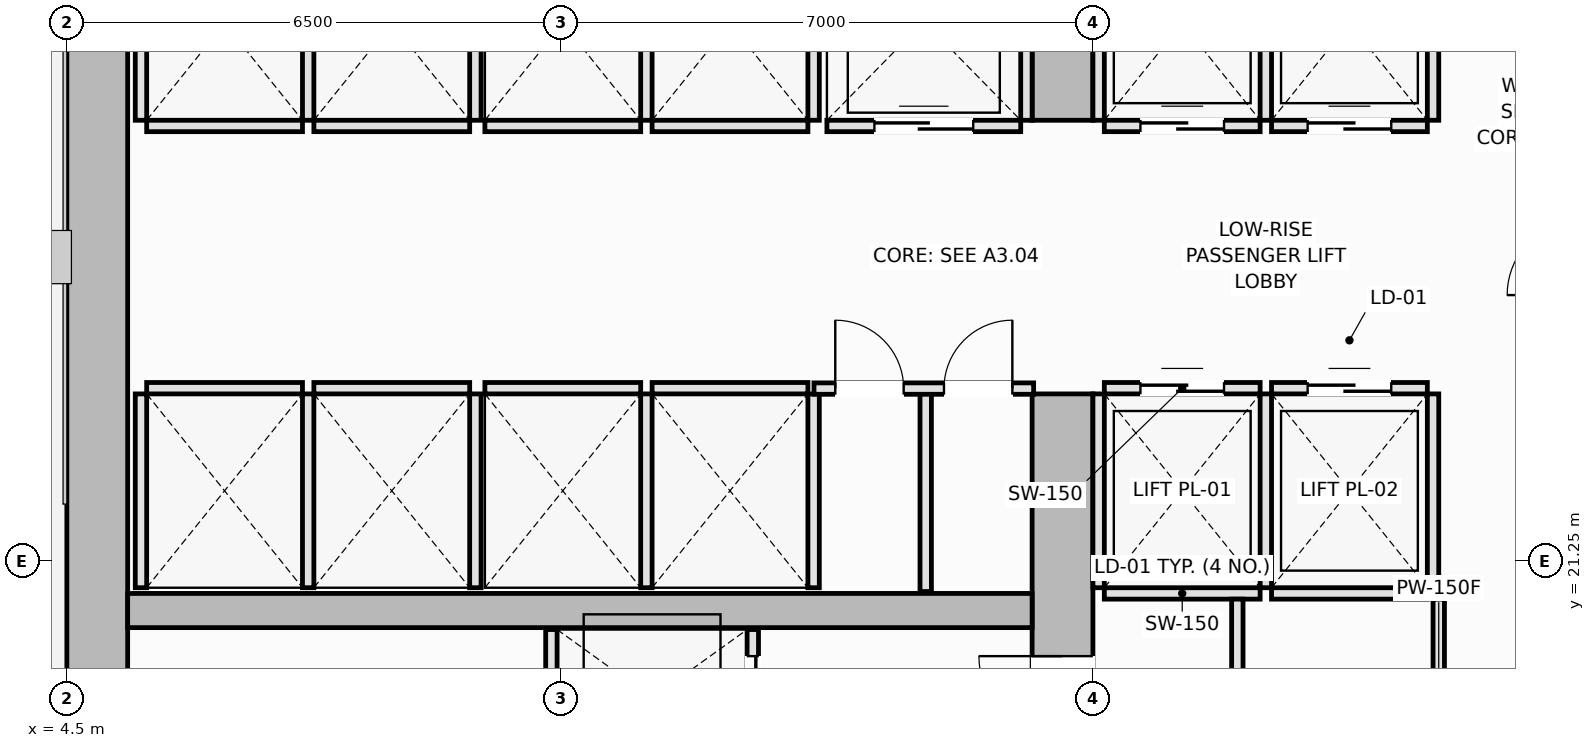
"""IFC4 building model, lengths in metres.
Left out: names, types, materials, properties, quantities, classifications, styles, units other than length and angle.
Written with IfcOpenShell. Run it as: python <this file> out.ifc"""

import sys

from ifc_helpers import new_model, si_unit, direction, frame, frame_2d, origin, place, context, subcontext, project, spatial, rectangle, extrude, element, fill, save


model = new_model("IFC4")
c1 = context("Model", 3, precision=1e-05, world=origin(), true_north=direction((0.0, 1.0)))
c2 = subcontext(c1, "Body", "Model", "MODEL_VIEW")
j1 = project(units=[si_unit("LENGTHUNIT", "METRE"), si_unit("PLANEANGLEUNIT", "RADIAN")], contexts=[c1])
p1 = place(None, origin())
s1 = spatial("IfcSite", under=j1, at=p1, CompositionType="ELEMENT")
p2 = place(p1, origin())
s2 = spatial("IfcBuilding", under=s1, at=p2, CompositionType="ELEMENT")
p3 = place(p2, frame((0.0, 0.0, 25.6)))
s3 = spatial("IfcBuildingStorey", under=s2, at=p3, CompositionType="ELEMENT", Elevation=25.6)
p4 = place(p3, frame((4.9, 14.8, 0.0), z_axis=(0.0, 0.0, 1.0), x_axis=(0.0, 1.0, 0.0)))
e1 = element("IfcWall", 1, at=p4, inside=s3, PredefinedType="SHEAR", context=c2, shape_type="SweptSolid", body=[
    extrude(rectangle(XDim=20.9, YDim=0.8, at=frame_2d((10.45, 0.0))), origin(), (0.0, 0.0, 1.0), 3.55),
])
p5 = place(p3, frame((17.6, 14.8, 0.0), z_axis=(0.0, 0.0, 1.0), x_axis=(0.0, 1.0, 0.0)))
e2 = element("IfcWall", 2, at=p5, inside=s3, PredefinedType="SHEAR", context=c2, shape_type="SweptSolid", body=[
    extrude(rectangle(XDim=8.65, YDim=0.8, at=frame_2d((4.325, 0.0))), origin(), (0.0, 0.0, 1.0), 3.55),
])
p6 = place(p5, frame((4.1, 0.0, 0.0)))
e3 = element("IfcOpeningElement", 3, at=p6, cuts=e2, PredefinedType="OPENING", context=c2, shape_type="SweptSolid", body=[
    extrude(rectangle(XDim=1.1, YDim=2.15, at=frame_2d((0.55, 1.075))), frame((0.0, 0.41, 0.0), z_axis=(0.0, -1.0, 0.0), x_axis=(1.0, 0.0, 0.0)), (0.0, 0.0, 1.0), 0.82),
])
p7 = place(p3, frame((17.6, 27.05, 0.0), z_axis=(0.0, 0.0, 1.0), x_axis=(0.0, 1.0, 0.0)))
e4 = element("IfcWall", 4, at=p7, inside=s3, PredefinedType="SHEAR", context=c2, shape_type="SweptSolid", body=[
    extrude(rectangle(XDim=8.65, YDim=0.8, at=frame_2d((4.325, 0.0))), origin(), (0.0, 0.0, 1.0), 3.55),
])
p8 = place(p7, frame((3.45, 0.0, 0.0)))
e5 = element("IfcOpeningElement", 5, at=p8, cuts=e4, PredefinedType="OPENING", context=c2, shape_type="SweptSolid", body=[
    extrude(rectangle(XDim=1.1, YDim=2.15, at=frame_2d((0.55, 1.075))), frame((0.0, 0.41, 0.0), z_axis=(0.0, -1.0, 0.0), x_axis=(1.0, 0.0, 0.0)), (0.0, 0.0, 1.0), 0.82),
])
p9 = place(p3, frame((5.3, 20.6, 0.0), z_axis=(0.0, 0.0, 1.0), x_axis=(1.0, 0.0, 0.0)))
e6 = element("IfcWall", 6, at=p9, inside=s3, PredefinedType="SHEAR", context=c2, shape_type="SweptSolid", body=[
    extrude(rectangle(XDim=11.9, YDim=0.45, at=frame_2d((5.95, 0.0))), origin(), (0.0, 0.0, 1.0), 3.55),
])
p10 = place(p3, frame((18.15, 20.825, 0.0), z_axis=(0.0, 0.0, 1.0), x_axis=(1.0, 0.0, 0.0)))
e7 = element("IfcWall", 7, at=p10, inside=s3, PredefinedType="PARTITIONING", context=c2, shape_type="SweptSolid", body=[
    extrude(rectangle(XDim=2.05, YDim=0.15, at=frame_2d((1.025, 0.0))), origin(), (0.0, 0.0, 1.0), 3.37),
])
p11 = place(p3, frame((18.15, 23.525, 0.0), z_axis=(0.0, 0.0, 1.0), x_axis=(1.0, 0.0, 0.0)))
e8 = element("IfcWall", 8, at=p11, inside=s3, PredefinedType="PARTITIONING", context=c2, shape_type="SweptSolid", body=[
    extrude(rectangle(XDim=2.05, YDim=0.15, at=frame_2d((1.025, 0.0))), origin(), (0.0, 0.0, 1.0), 3.37),
])
p12 = place(p11, frame((0.475, 0.0, 0.0)))
e9 = element("IfcOpeningElement", 9, at=p12, cuts=e8, PredefinedType="OPENING", context=c2, shape_type="SweptSolid", body=[
    extrude(rectangle(XDim=1.1, YDim=2.2, at=frame_2d((0.55, 1.1))), frame((0.0, 0.085, 0.0), z_axis=(0.0, -1.0, 0.0), x_axis=(1.0, 0.0, 0.0)), (0.0, 0.0, 1.0), 0.17),
])
for number, where, z_axis, x_axis in (
    (10, (18.075, 20.9, 0.0), (0.0, 0.0, 1.0), (0.0, 1.0, 0.0)),
    (11, (20.275, 20.9, 0.0), (0.0, 0.0, 1.0), (0.0, 1.0, 0.0)),
):
    element("IfcWall", number, at=place(p3, frame(where, z_axis=z_axis, x_axis=x_axis)), inside=s3, PredefinedType="PARTITIONING", context=c2, shape_type="SweptSolid", body=[
        extrude(rectangle(XDim=2.55, YDim=0.15, at=frame_2d((1.275, 0.0))), origin(), (0.0, 0.0, 1.0), 3.37),
    ])
p13 = place(p3, frame((20.35, 20.825, 0.0), z_axis=(0.0, 0.0, 1.0), x_axis=(1.0, 0.0, 0.0)))
e12 = element("IfcWall", 12, at=p13, inside=s3, PredefinedType="PARTITIONING", context=c2, shape_type="SweptSolid", body=[
    extrude(rectangle(XDim=2.05, YDim=0.15, at=frame_2d((1.025, 0.0))), origin(), (0.0, 0.0, 1.0), 3.37),
])
p14 = place(p3, frame((20.35, 23.525, 0.0), z_axis=(0.0, 0.0, 1.0), x_axis=(1.0, 0.0, 0.0)))
e13 = element("IfcWall", 13, at=p14, inside=s3, PredefinedType="PARTITIONING", context=c2, shape_type="SweptSolid", body=[
    extrude(rectangle(XDim=2.05, YDim=0.15, at=frame_2d((1.025, 0.0))), origin(), (0.0, 0.0, 1.0), 3.37),
])
p15 = place(p14, frame((0.475, 0.0, 0.0)))
e14 = element("IfcOpeningElement", 14, at=p15, cuts=e13, PredefinedType="OPENING", context=c2, shape_type="SweptSolid", body=[
    extrude(rectangle(XDim=1.1, YDim=2.2, at=frame_2d((0.55, 1.1))), frame((0.0, 0.085, 0.0), z_axis=(0.0, -1.0, 0.0), x_axis=(1.0, 0.0, 0.0)), (0.0, 0.0, 1.0), 0.17),
])
p16 = place(p3, frame((22.475, 20.9, 0.0), z_axis=(0.0, 0.0, 1.0), x_axis=(0.0, 1.0, 0.0)))
e15 = element("IfcWall", 15, at=p16, inside=s3, PredefinedType="PARTITIONING", context=c2, shape_type="SweptSolid", body=[
    extrude(rectangle(XDim=2.55, YDim=0.15, at=frame_2d((1.275, 0.0))), origin(), (0.0, 0.0, 1.0), 3.37),
])
p17 = place(p3, frame((18.15, 26.975, 0.0), z_axis=(0.0, 0.0, 1.0), x_axis=(1.0, 0.0, 0.0)))
e16 = element("IfcWall", 16, at=p17, inside=s3, PredefinedType="PARTITIONING", context=c2, shape_type="SweptSolid", body=[
    extrude(rectangle(XDim=2.05, YDim=0.15, at=frame_2d((1.025, 0.0))), origin(), (0.0, 0.0, 1.0), 3.37),
])
p18 = place(p17, frame((0.475, 0.0, 0.0)))
e17 = element("IfcOpeningElement", 17, at=p18, cuts=e16, PredefinedType="OPENING", context=c2, shape_type="SweptSolid", body=[
    extrude(rectangle(XDim=1.1, YDim=2.2, at=frame_2d((0.55, 1.1))), frame((0.0, 0.085, 0.0), z_axis=(0.0, -1.0, 0.0), x_axis=(1.0, 0.0, 0.0)), (0.0, 0.0, 1.0), 0.17),
])
for number, where, z_axis, x_axis in (
    (18, (18.075, 27.05, 0.0), (0.0, 0.0, 1.0), (0.0, 1.0, 0.0)),
    (19, (20.275, 27.05, 0.0), (0.0, 0.0, 1.0), (0.0, 1.0, 0.0)),
):
    element("IfcWall", number, at=place(p3, frame(where, z_axis=z_axis, x_axis=x_axis)), inside=s3, PredefinedType="PARTITIONING", context=c2, shape_type="SweptSolid", body=[
        extrude(rectangle(XDim=2.55, YDim=0.15, at=frame_2d((1.275, 0.0))), origin(), (0.0, 0.0, 1.0), 3.37),
    ])
p19 = place(p3, frame((20.35, 26.975, 0.0), z_axis=(0.0, 0.0, 1.0), x_axis=(1.0, 0.0, 0.0)))
e20 = element("IfcWall", 20, at=p19, inside=s3, PredefinedType="PARTITIONING", context=c2, shape_type="SweptSolid", body=[
    extrude(rectangle(XDim=2.05, YDim=0.15, at=frame_2d((1.025, 0.0))), origin(), (0.0, 0.0, 1.0), 3.37),
])
p20 = place(p19, frame((0.475, 0.0, 0.0)))
e21 = element("IfcOpeningElement", 21, at=p20, cuts=e20, PredefinedType="OPENING", context=c2, shape_type="SweptSolid", body=[
    extrude(rectangle(XDim=1.1, YDim=2.2, at=frame_2d((0.55, 1.1))), frame((0.0, 0.085, 0.0), z_axis=(0.0, -1.0, 0.0), x_axis=(1.0, 0.0, 0.0)), (0.0, 0.0, 1.0), 0.17),
])
p21 = place(p3, frame((22.475, 27.05, 0.0), z_axis=(0.0, 0.0, 1.0), x_axis=(0.0, 1.0, 0.0)))
e22 = element("IfcWall", 22, at=p21, inside=s3, PredefinedType="PARTITIONING", context=c2, shape_type="SweptSolid", body=[
    extrude(rectangle(XDim=2.55, YDim=0.15, at=frame_2d((1.275, 0.0))), origin(), (0.0, 0.0, 1.0), 3.37),
])
p22 = place(p3, frame((5.55, 23.525, 0.0), z_axis=(0.0, 0.0, 1.0), x_axis=(1.0, 0.0, 0.0)))
e23 = element("IfcWall", 23, at=p22, inside=s3, PredefinedType="PARTITIONING", context=c2, shape_type="SweptSolid", body=[
    extrude(rectangle(XDim=2.05, YDim=0.15, at=frame_2d((1.025, 0.0))), origin(), (0.0, 0.0, 1.0), 3.37),
])
for number, where, z_axis, x_axis in (
    (24, (5.475, 20.9, 0.0), (0.0, 0.0, 1.0), (0.0, 1.0, 0.0)),
    (25, (7.675, 20.9, 0.0), (0.0, 0.0, 1.0), (0.0, 1.0, 0.0)),
):
    element("IfcWall", number, at=place(p3, frame(where, z_axis=z_axis, x_axis=x_axis)), inside=s3, PredefinedType="PARTITIONING", context=c2, shape_type="SweptSolid", body=[
        extrude(rectangle(XDim=2.55, YDim=0.15, at=frame_2d((1.275, 0.0))), origin(), (0.0, 0.0, 1.0), 3.37),
    ])
p23 = place(p3, frame((7.75, 23.525, 0.0), z_axis=(0.0, 0.0, 1.0), x_axis=(1.0, 0.0, 0.0)))
e26 = element("IfcWall", 26, at=p23, inside=s3, PredefinedType="PARTITIONING", context=c2, shape_type="SweptSolid", body=[
    extrude(rectangle(XDim=2.05, YDim=0.15, at=frame_2d((1.025, 0.0))), origin(), (0.0, 0.0, 1.0), 3.37),
])
p24 = place(p3, frame((9.875, 20.9, 0.0), z_axis=(0.0, 0.0, 1.0), x_axis=(0.0, 1.0, 0.0)))
e27 = element("IfcWall", 27, at=p24, inside=s3, PredefinedType="PARTITIONING", context=c2, shape_type="SweptSolid", body=[
    extrude(rectangle(XDim=2.55, YDim=0.15, at=frame_2d((1.275, 0.0))), origin(), (0.0, 0.0, 1.0), 3.37),
])
p25 = place(p3, frame((5.55, 26.975, 0.0), z_axis=(0.0, 0.0, 1.0), x_axis=(1.0, 0.0, 0.0)))
e28 = element("IfcWall", 28, at=p25, inside=s3, PredefinedType="PARTITIONING", context=c2, shape_type="SweptSolid", body=[
    extrude(rectangle(XDim=2.05, YDim=0.15, at=frame_2d((1.025, 0.0))), origin(), (0.0, 0.0, 1.0), 3.37),
])
for number, where, z_axis, x_axis in (
    (29, (5.475, 27.05, 0.0), (0.0, 0.0, 1.0), (0.0, 1.0, 0.0)),
    (30, (7.675, 27.05, 0.0), (0.0, 0.0, 1.0), (0.0, 1.0, 0.0)),
):
    element("IfcWall", number, at=place(p3, frame(where, z_axis=z_axis, x_axis=x_axis)), inside=s3, PredefinedType="PARTITIONING", context=c2, shape_type="SweptSolid", body=[
        extrude(rectangle(XDim=2.55, YDim=0.15, at=frame_2d((1.275, 0.0))), origin(), (0.0, 0.0, 1.0), 3.37),
    ])
p26 = place(p3, frame((7.75, 26.975, 0.0), z_axis=(0.0, 0.0, 1.0), x_axis=(1.0, 0.0, 0.0)))
e31 = element("IfcWall", 31, at=p26, inside=s3, PredefinedType="PARTITIONING", context=c2, shape_type="SweptSolid", body=[
    extrude(rectangle(XDim=2.05, YDim=0.15, at=frame_2d((1.025, 0.0))), origin(), (0.0, 0.0, 1.0), 3.37),
])
p27 = place(p3, frame((9.875, 27.05, 0.0), z_axis=(0.0, 0.0, 1.0), x_axis=(0.0, 1.0, 0.0)))
e32 = element("IfcWall", 32, at=p27, inside=s3, PredefinedType="PARTITIONING", context=c2, shape_type="SweptSolid", body=[
    extrude(rectangle(XDim=2.55, YDim=0.15, at=frame_2d((1.275, 0.0))), origin(), (0.0, 0.0, 1.0), 3.37),
])
p28 = place(p3, frame((10.0, 23.525, 0.0), z_axis=(0.0, 0.0, 1.0), x_axis=(1.0, 0.0, 0.0)))
e33 = element("IfcWall", 33, at=p28, inside=s3, PredefinedType="PARTITIONING", context=c2, shape_type="SweptSolid", body=[
    extrude(rectangle(XDim=2.05, YDim=0.15, at=frame_2d((1.025, 0.0))), origin(), (0.0, 0.0, 1.0), 3.37),
])
p29 = place(p3, frame((12.125, 20.9, 0.0), z_axis=(0.0, 0.0, 1.0), x_axis=(0.0, 1.0, 0.0)))
e34 = element("IfcWall", 34, at=p29, inside=s3, PredefinedType="PARTITIONING", context=c2, shape_type="SweptSolid", body=[
    extrude(rectangle(XDim=2.55, YDim=0.15, at=frame_2d((1.275, 0.0))), origin(), (0.0, 0.0, 1.0), 3.37),
])
p30 = place(p3, frame((12.2, 23.525, 0.0), z_axis=(0.0, 0.0, 1.0), x_axis=(1.0, 0.0, 0.0)))
e35 = element("IfcWall", 35, at=p30, inside=s3, PredefinedType="PARTITIONING", context=c2, shape_type="SweptSolid", body=[
    extrude(rectangle(XDim=2.05, YDim=0.15, at=frame_2d((1.025, 0.0))), origin(), (0.0, 0.0, 1.0), 3.37),
])
p31 = place(p3, frame((14.325, 20.9, 0.0), z_axis=(0.0, 0.0, 1.0), x_axis=(0.0, 1.0, 0.0)))
e36 = element("IfcWall", 36, at=p31, inside=s3, PredefinedType="PARTITIONING", context=c2, shape_type="SweptSolid", body=[
    extrude(rectangle(XDim=2.55, YDim=0.15, at=frame_2d((1.275, 0.0))), origin(), (0.0, 0.0, 1.0), 3.37),
])
p32 = place(p3, frame((10.0, 26.975, 0.0), z_axis=(0.0, 0.0, 1.0), x_axis=(1.0, 0.0, 0.0)))
e37 = element("IfcWall", 37, at=p32, inside=s3, PredefinedType="PARTITIONING", context=c2, shape_type="SweptSolid", body=[
    extrude(rectangle(XDim=2.05, YDim=0.15, at=frame_2d((1.025, 0.0))), origin(), (0.0, 0.0, 1.0), 3.37),
])
p33 = place(p3, frame((12.125, 27.05, 0.0), z_axis=(0.0, 0.0, 1.0), x_axis=(0.0, 1.0, 0.0)))
e38 = element("IfcWall", 38, at=p33, inside=s3, PredefinedType="PARTITIONING", context=c2, shape_type="SweptSolid", body=[
    extrude(rectangle(XDim=2.55, YDim=0.15, at=frame_2d((1.275, 0.0))), origin(), (0.0, 0.0, 1.0), 3.37),
])
p34 = place(p3, frame((12.2, 26.975, 0.0), z_axis=(0.0, 0.0, 1.0), x_axis=(1.0, 0.0, 0.0)))
e39 = element("IfcWall", 39, at=p34, inside=s3, PredefinedType="PARTITIONING", context=c2, shape_type="SweptSolid", body=[
    extrude(rectangle(XDim=2.05, YDim=0.15, at=frame_2d((1.025, 0.0))), origin(), (0.0, 0.0, 1.0), 3.37),
])
p35 = place(p3, frame((14.325, 27.05, 0.0), z_axis=(0.0, 0.0, 1.0), x_axis=(0.0, 1.0, 0.0)))
e40 = element("IfcWall", 40, at=p35, inside=s3, PredefinedType="PARTITIONING", context=c2, shape_type="SweptSolid", body=[
    extrude(rectangle(XDim=2.55, YDim=0.15, at=frame_2d((1.275, 0.0))), origin(), (0.0, 0.0, 1.0), 3.37),
])
p36 = place(p3, frame((14.5, 26.975, 0.0), z_axis=(0.0, 0.0, 1.0), x_axis=(1.0, 0.0, 0.0)))
e41 = element("IfcWall", 41, at=p36, inside=s3, PredefinedType="PARTITIONING", context=c2, shape_type="SweptSolid", body=[
    extrude(rectangle(XDim=2.55, YDim=0.15, at=frame_2d((1.275, 0.0))), origin(), (0.0, 0.0, 1.0), 3.37),
])
p37 = place(p36, frame((0.625, 0.0, 0.0)))
e42 = element("IfcOpeningElement", 42, at=p37, cuts=e41, PredefinedType="OPENING", context=c2, shape_type="SweptSolid", body=[
    extrude(rectangle(XDim=1.3, YDim=2.2, at=frame_2d((0.65, 1.1))), frame((0.0, 0.085, 0.0), z_axis=(0.0, -1.0, 0.0), x_axis=(1.0, 0.0, 0.0)), (0.0, 0.0, 1.0), 0.17),
])
p38 = place(p3, frame((17.125, 27.05, 0.0), z_axis=(0.0, 0.0, 1.0), x_axis=(0.0, 1.0, 0.0)))
e43 = element("IfcWall", 43, at=p38, inside=s3, PredefinedType="PARTITIONING", context=c2, shape_type="SweptSolid", body=[
    extrude(rectangle(XDim=2.6, YDim=0.15, at=frame_2d((1.3, 0.0))), origin(), (0.0, 0.0, 1.0), 3.37),
])
p39 = place(p3, frame((10.875, 18.55, 0.0), z_axis=(0.0, 0.0, 1.0), x_axis=(0.0, 1.0, 0.0)))
e44 = element("IfcWall", 44, at=p39, inside=s3, PredefinedType="PARTITIONING", context=c2, shape_type="SweptSolid", body=[
    extrude(rectangle(XDim=1.8, YDim=0.15, at=frame_2d((0.9, 0.0))), origin(), (0.0, 0.0, 1.0), 3.37),
])
p40 = place(p3, frame((13.525, 18.55, 0.0), z_axis=(0.0, 0.0, 1.0), x_axis=(0.0, 1.0, 0.0)))
e45 = element("IfcWall", 45, at=p40, inside=s3, PredefinedType="PARTITIONING", context=c2, shape_type="SweptSolid", body=[
    extrude(rectangle(XDim=1.8, YDim=0.15, at=frame_2d((0.9, 0.0))), origin(), (0.0, 0.0, 1.0), 3.37),
])
p41 = place(p40, frame((0.35, 0.0, 0.0)))
e46 = element("IfcOpeningElement", 46, at=p41, cuts=e45, PredefinedType="OPENING", context=c2, shape_type="SweptSolid", body=[
    extrude(rectangle(XDim=1.1, YDim=2.2, at=frame_2d((0.55, 1.1))), frame((0.0, 0.085, 0.0), z_axis=(0.0, -1.0, 0.0), x_axis=(1.0, 0.0, 0.0)), (0.0, 0.0, 1.0), 0.17),
])
p42 = place(p3, frame((15.8, 20.85, 0.0), z_axis=(0.0, 0.0, 1.0), x_axis=(0.0, 1.0, 0.0)))
e47 = element("IfcWall", 47, at=p42, inside=s3, PredefinedType="PARTITIONING", context=c2, shape_type="SweptSolid", body=[
    extrude(rectangle(XDim=2.67, YDim=0.15, at=frame_2d((1.335, 0.0))), origin(), (0.0, 0.0, 1.0), 3.37),
])
p43 = place(p3, frame((14.33, 23.52, 0.0), z_axis=(0.0, 0.0, 1.0), x_axis=(1.0, 0.0, 0.0)))
e48 = element("IfcWall", 48, at=p43, inside=s3, PredefinedType="PARTITIONING", context=c2, shape_type="SweptSolid", body=[
    extrude(rectangle(XDim=2.89, YDim=0.15, at=frame_2d((1.445, 0.0))), origin(), (0.0, 0.0, 1.0), 3.37),
])
p44 = place(p43, frame((0.28, 0.0, 0.0)))
e49 = element("IfcOpeningElement", 49, at=p44, cuts=e48, PredefinedType="OPENING", context=c2, shape_type="SweptSolid", body=[
    extrude(rectangle(XDim=0.9, YDim=2.1, at=frame_2d((0.45, 1.05))), frame((0.0, 0.085, 0.0), z_axis=(0.0, -1.0, 0.0), x_axis=(1.0, 0.0, 0.0)), (0.0, 0.0, 1.0), 0.17),
])
p45 = place(p43, frame((1.71, 0.0, 0.0)))
e50 = element("IfcOpeningElement", 50, at=p45, cuts=e48, PredefinedType="OPENING", context=c2, shape_type="SweptSolid", body=[
    extrude(rectangle(XDim=0.9, YDim=2.1, at=frame_2d((0.45, 1.05))), frame((0.0, 0.085, 0.0), z_axis=(0.0, -1.0, 0.0), x_axis=(1.0, 0.0, 0.0)), (0.0, 0.0, 1.0), 0.17),
])
p46 = place(p3, frame((22.55, 17.73, 0.0), z_axis=(0.0, 0.0, 1.0), x_axis=(0.0, 1.0, 0.0)))
e51 = element("IfcWall", 51, at=p46, inside=s3, PredefinedType="PARTITIONING", context=c2, shape_type="SweptSolid", body=[
    extrude(rectangle(XDim=3.02, YDim=0.15, at=frame_2d((1.51, 0.0))), origin(), (0.0, 0.0, 1.0), 3.01),
])
p47 = place(p46, frame((1.01, 0.0, 0.0)))
e52 = element("IfcOpeningElement", 52, at=p47, cuts=e51, PredefinedType="OPENING", context=c2, shape_type="SweptSolid", body=[
    extrude(rectangle(XDim=1.0, YDim=2.15, at=frame_2d((0.5, 1.075))), frame((0.0, 0.085, 0.0), z_axis=(0.0, -1.0, 0.0), x_axis=(1.0, 0.0, 0.0)), (0.0, 0.0, 1.0), 0.17),
])
p48 = place(p3, frame((19.9, 17.73, 0.0), z_axis=(0.0, 0.0, 1.0), x_axis=(0.0, 1.0, 0.0)))
e53 = element("IfcWall", 53, at=p48, inside=s3, PredefinedType="PARTITIONING", context=c2, shape_type="SweptSolid", body=[
    extrude(rectangle(XDim=3.02, YDim=0.15, at=frame_2d((1.51, 0.0))), origin(), (0.0, 0.0, 1.0), 3.37),
])
p49 = place(p12, origin())
e54 = element("IfcDoor", 54, at=p49, inside=s3, OperationType="DOUBLE_DOOR_SLIDING", PredefinedType="DOOR", context=c2, shape_type="SweptSolid", body=[
    extrude(rectangle(XDim=1.1, YDim=2.2, at=frame_2d((0.55, 1.1))), frame((0.0, 0.025, 0.0), z_axis=(0.0, -1.0, 0.0), x_axis=(1.0, 0.0, 0.0)), (0.0, 0.0, 1.0), 0.05),
])
fill(e9, e54)
p50 = place(p15, origin())
e55 = element("IfcDoor", 55, at=p50, inside=s3, OperationType="DOUBLE_DOOR_SLIDING", PredefinedType="DOOR", context=c2, shape_type="SweptSolid", body=[
    extrude(rectangle(XDim=1.1, YDim=2.2, at=frame_2d((0.55, 1.1))), frame((0.0, 0.025, 0.0), z_axis=(0.0, -1.0, 0.0), x_axis=(1.0, 0.0, 0.0)), (0.0, 0.0, 1.0), 0.05),
])
fill(e14, e55)
p51 = place(p18, origin())
e56 = element("IfcDoor", 56, at=p51, inside=s3, OperationType="DOUBLE_DOOR_SLIDING", PredefinedType="DOOR", context=c2, shape_type="SweptSolid", body=[
    extrude(rectangle(XDim=1.1, YDim=2.2, at=frame_2d((0.55, 1.1))), frame((0.0, 0.025, 0.0), z_axis=(0.0, -1.0, 0.0), x_axis=(1.0, 0.0, 0.0)), (0.0, 0.0, 1.0), 0.05),
])
fill(e17, e56)
p52 = place(p20, origin())
e57 = element("IfcDoor", 57, at=p52, inside=s3, OperationType="DOUBLE_DOOR_SLIDING", PredefinedType="DOOR", context=c2, shape_type="SweptSolid", body=[
    extrude(rectangle(XDim=1.1, YDim=2.2, at=frame_2d((0.55, 1.1))), frame((0.0, 0.025, 0.0), z_axis=(0.0, -1.0, 0.0), x_axis=(1.0, 0.0, 0.0)), (0.0, 0.0, 1.0), 0.05),
])
fill(e21, e57)
p53 = place(p37, origin())
e58 = element("IfcDoor", 58, at=p53, inside=s3, OperationType="DOUBLE_DOOR_SLIDING", PredefinedType="DOOR", context=c2, shape_type="SweptSolid", body=[
    extrude(rectangle(XDim=1.3, YDim=2.2, at=frame_2d((0.65, 1.1))), frame((0.0, 0.025, 0.0), z_axis=(0.0, -1.0, 0.0), x_axis=(1.0, 0.0, 0.0)), (0.0, 0.0, 1.0), 0.05),
])
fill(e42, e58)
p54 = place(p41, origin())
e59 = element("IfcDoor", 59, at=p54, inside=s3, OperationType="DOUBLE_DOOR_SLIDING", PredefinedType="DOOR", context=c2, shape_type="SweptSolid", body=[
    extrude(rectangle(XDim=1.1, YDim=2.2, at=frame_2d((0.55, 1.1))), frame((0.0, 0.025, 0.0), z_axis=(0.0, -1.0, 0.0), x_axis=(1.0, 0.0, 0.0)), (0.0, 0.0, 1.0), 0.05),
])
fill(e46, e59)
p55 = place(p6, origin())
e60 = element("IfcDoor", 60, at=p55, inside=s3, OperationType="SINGLE_SWING_RIGHT", PredefinedType="DOOR", context=c2, shape_type="SweptSolid", body=[
    extrude(rectangle(XDim=1.1, YDim=2.15, at=frame_2d((0.55, 1.075))), frame((0.0, 0.025, 0.0), z_axis=(0.0, -1.0, 0.0), x_axis=(1.0, 0.0, 0.0)), (0.0, 0.0, 1.0), 0.05),
])
fill(e3, e60)
p56 = place(p44, origin())
e61 = element("IfcDoor", 61, at=p56, inside=s3, OperationType="SINGLE_SWING_LEFT", PredefinedType="DOOR", context=c2, shape_type="SweptSolid", body=[
    extrude(rectangle(XDim=0.9, YDim=2.1, at=frame_2d((0.45, 1.05))), frame((0.0, 0.025, 0.0), z_axis=(0.0, -1.0, 0.0), x_axis=(1.0, 0.0, 0.0)), (0.0, 0.0, 1.0), 0.05),
])
fill(e49, e61)
p57 = place(p45, origin())
e62 = element("IfcDoor", 62, at=p57, inside=s3, OperationType="SINGLE_SWING_RIGHT", PredefinedType="DOOR", context=c2, shape_type="SweptSolid", body=[
    extrude(rectangle(XDim=0.9, YDim=2.1, at=frame_2d((0.45, 1.05))), frame((0.0, 0.025, 0.0), z_axis=(0.0, -1.0, 0.0), x_axis=(1.0, 0.0, 0.0)), (0.0, 0.0, 1.0), 0.05),
])
fill(e50, e62)
save(model, sys.argv[1])
